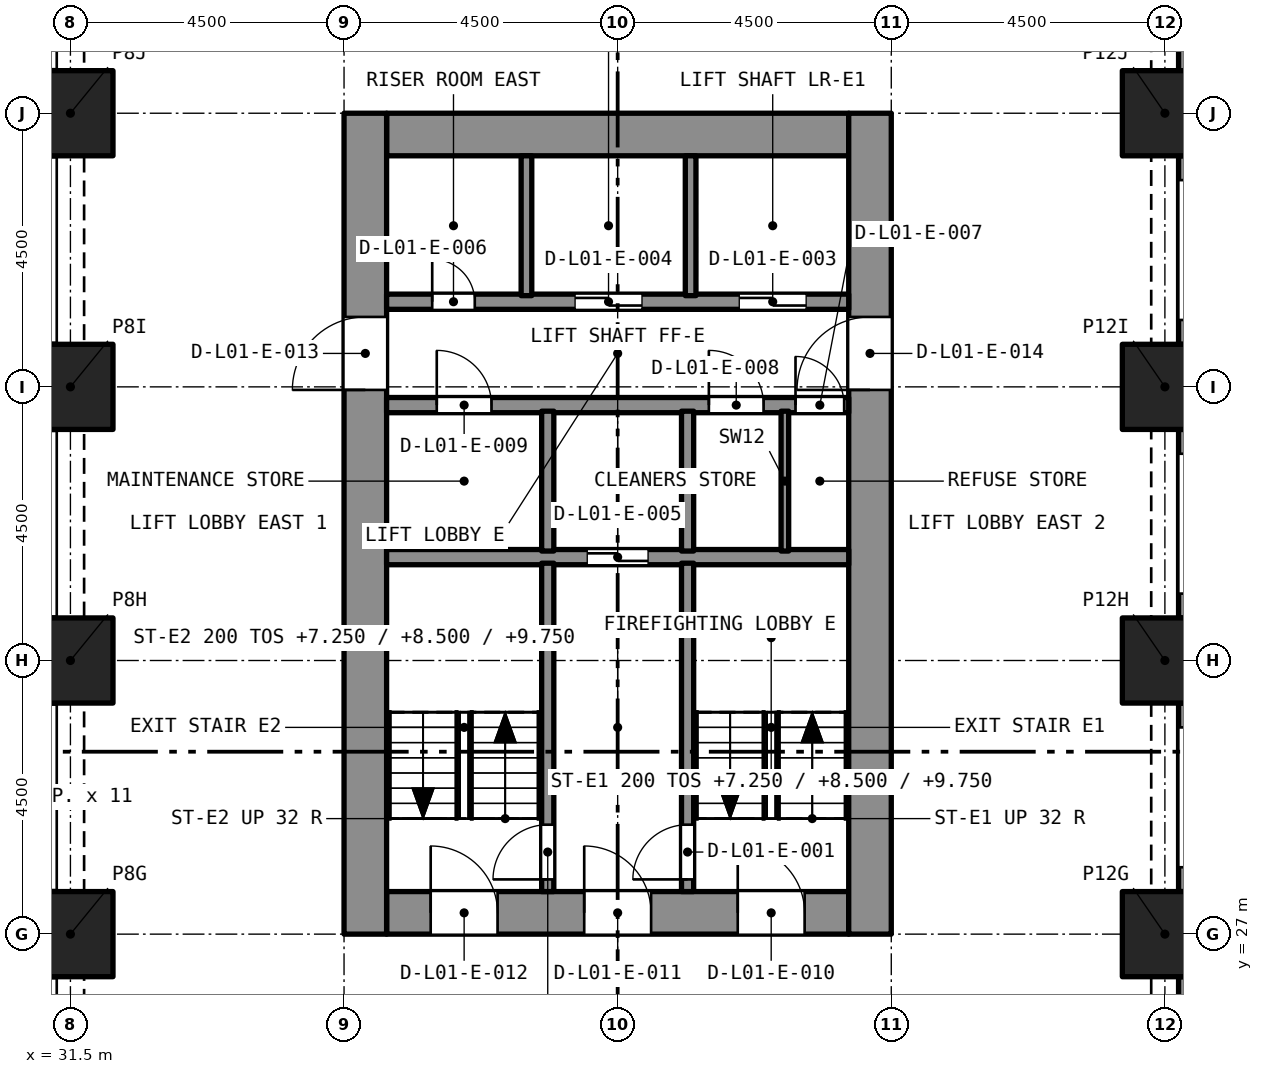
"""IFC4 building model, lengths in metres.
Left out: names, types, materials, properties, quantities, classifications, styles, units other than length and angle.
Written with IfcOpenShell. Run it as: python <this file> out.ifc"""

import sys

from ifc_helpers import new_model, si_unit, direction, frame, frame_2d, origin, origin_2d, place, context, subcontext, project, spatial, rectangle, extrude, element, fill, save


model = new_model("IFC4")
c1 = context("Model", 3, precision=1e-05, world=origin(), true_north=direction((0.0, 1.0)))
c2 = subcontext(c1, "Body", "Model", "MODEL_VIEW")
j1 = project(units=[si_unit("LENGTHUNIT", "METRE"), si_unit("PLANEANGLEUNIT", "RADIAN")], contexts=[c1])
p1 = place(None, origin())
s1 = spatial("IfcSite", under=j1, at=p1, CompositionType="ELEMENT")
p2 = place(p1, origin())
s2 = spatial("IfcBuilding", under=s1, at=p2, CompositionType="ELEMENT")
p3 = place(p2, frame((0.0, 0.0, 6.0)))
s3 = spatial("IfcBuildingStorey", under=s2, at=p3, CompositionType="ELEMENT", Elevation=6.0)
for number, where, z_axis, x_axis in (
    (1, (31.5, 27.0, 0.0), (0.0, 0.0, 1.0), (1.0, 0.0, 0.0)),
    (2, (49.5, 27.0, 0.0), (0.0, 0.0, 1.0), (1.0, 0.0, 0.0)),
    (3, (31.5, 31.5, 0.0), (0.0, 0.0, 1.0), (1.0, 0.0, 0.0)),
    (4, (49.5, 31.5, 0.0), (0.0, 0.0, 1.0), (1.0, 0.0, 0.0)),
    (5, (31.5, 36.0, 0.0), (0.0, 0.0, 1.0), (1.0, 0.0, 0.0)),
    (6, (49.5, 36.0, 0.0), (0.0, 0.0, 1.0), (1.0, 0.0, 0.0)),
    (7, (31.5, 40.5, 0.0), (0.0, 0.0, 1.0), (1.0, 0.0, 0.0)),
    (8, (49.5, 40.5, 0.0), (0.0, 0.0, 1.0), (1.0, 0.0, 0.0)),
):
    element("IfcColumn", number, at=place(p3, frame(where, z_axis=z_axis, x_axis=x_axis)), inside=s3, PredefinedType="COLUMN", context=c2, shape_type="SweptSolid", body=[
        extrude(rectangle(XDim=1.4, YDim=1.4, at=origin_2d()), origin(), (0.0, 0.0, 1.0), 5.0),
    ])
p4 = place(p3, frame((36.7, 27.35, 0.0), z_axis=(0.0, 0.0, 1.0), x_axis=(1.0, 0.0, 0.0)))
e9 = element("IfcWall", 9, at=p4, inside=s3, PredefinedType="SOLIDWALL", context=c2, shape_type="SweptSolid", body=[
    extrude(rectangle(XDim=7.6, YDim=0.7, at=frame_2d((3.8, 0.0))), origin(), (0.0, 0.0, 1.0), 5.0),
])
p5 = place(p4, frame((5.775, 0.0, 0.0)))
e10 = element("IfcOpeningElement", 10, at=p5, cuts=e9, PredefinedType="OPENING", context=c2, shape_type="SweptSolid", body=[
    extrude(rectangle(XDim=1.1, YDim=2.1, at=frame_2d((0.55, 1.05))), frame((0.0, 0.36, 0.0), z_axis=(0.0, -1.0, 0.0), x_axis=(1.0, 0.0, 0.0)), (0.0, 0.0, 1.0), 0.72),
])
p6 = place(p4, frame((3.25, 0.0, 0.0)))
e11 = element("IfcOpeningElement", 11, at=p6, cuts=e9, PredefinedType="OPENING", context=c2, shape_type="SweptSolid", body=[
    extrude(rectangle(XDim=1.1, YDim=2.1, at=frame_2d((0.55, 1.05))), frame((0.0, 0.36, 0.0), z_axis=(0.0, -1.0, 0.0), x_axis=(1.0, 0.0, 0.0)), (0.0, 0.0, 1.0), 0.72),
])
p7 = place(p4, frame((0.725, 0.0, 0.0)))
e12 = element("IfcOpeningElement", 12, at=p7, cuts=e9, PredefinedType="OPENING", context=c2, shape_type="SweptSolid", body=[
    extrude(rectangle(XDim=1.1, YDim=2.1, at=frame_2d((0.55, 1.05))), frame((0.0, 0.36, 0.0), z_axis=(0.0, -1.0, 0.0), x_axis=(1.0, 0.0, 0.0)), (0.0, 0.0, 1.0), 0.72),
])
p8 = place(p3, frame((36.7, 40.15, 0.0), z_axis=(0.0, 0.0, 1.0), x_axis=(1.0, 0.0, 0.0)))
e13 = element("IfcWall", 13, at=p8, inside=s3, PredefinedType="SOLIDWALL", context=c2, shape_type="SweptSolid", body=[
    extrude(rectangle(XDim=7.6, YDim=0.7, at=frame_2d((3.8, 0.0))), origin(), (0.0, 0.0, 1.0), 5.0),
])
p9 = place(p3, frame((36.35, 27.0, 0.0), z_axis=(0.0, 0.0, 1.0), x_axis=(0.0, 1.0, 0.0)))
e14 = element("IfcWall", 14, at=p9, inside=s3, PredefinedType="SOLIDWALL", context=c2, shape_type="SweptSolid", body=[
    extrude(rectangle(XDim=13.5, YDim=0.7, at=frame_2d((6.75, 0.0))), origin(), (0.0, 0.0, 1.0), 5.0),
])
p10 = place(p9, frame((8.95, 0.0, 0.0)))
e15 = element("IfcOpeningElement", 15, at=p10, cuts=e14, PredefinedType="OPENING", context=c2, shape_type="SweptSolid", body=[
    extrude(rectangle(XDim=1.2, YDim=2.1, at=frame_2d((0.6, 1.05))), frame((0.0, 0.36, 0.0), z_axis=(0.0, -1.0, 0.0), x_axis=(1.0, 0.0, 0.0)), (0.0, 0.0, 1.0), 0.72),
])
p11 = place(p3, frame((44.65, 27.0, 0.0), z_axis=(0.0, 0.0, 1.0), x_axis=(0.0, 1.0, 0.0)))
e16 = element("IfcWall", 16, at=p11, inside=s3, PredefinedType="SOLIDWALL", context=c2, shape_type="SweptSolid", body=[
    extrude(rectangle(XDim=13.5, YDim=0.7, at=frame_2d((6.75, 0.0))), origin(), (0.0, 0.0, 1.0), 5.0),
])
p12 = place(p11, frame((8.95, 0.0, 0.0)))
e17 = element("IfcOpeningElement", 17, at=p12, cuts=e16, PredefinedType="OPENING", context=c2, shape_type="SweptSolid", body=[
    extrude(rectangle(XDim=1.2, YDim=2.1, at=frame_2d((0.6, 1.05))), frame((0.0, 0.36, 0.0), z_axis=(0.0, -1.0, 0.0), x_axis=(1.0, 0.0, 0.0)), (0.0, 0.0, 1.0), 0.72),
])
p13 = place(p3, frame((49.875, 26.3, 0.0), z_axis=(0.0, 0.0, 1.0), x_axis=(0.0, -1.0, 0.0)))
e18 = element("IfcWall", 18, at=p13, inside=s3, PredefinedType="SOLIDWALL", context=c2, shape_type="SweptSolid", body=[
    extrude(rectangle(XDim=3.1, YDim=0.3, at=frame_2d((1.55, 0.0))), origin(), (0.0, 0.0, 1.0), 5.0),
])
p14 = place(p13, frame((0.4, 0.0, 0.45)))
e19 = element("IfcOpeningElement", 19, at=p14, cuts=e18, PredefinedType="OPENING", context=c2, shape_type="SweptSolid", body=[
    extrude(rectangle(XDim=2.3, YDim=3.3, at=frame_2d((1.15, 1.65))), frame((0.0, 0.16, 0.0), z_axis=(0.0, -1.0, 0.0), x_axis=(1.0, 0.0, 0.0)), (0.0, 0.0, 1.0), 0.32),
])
p15 = place(p3, frame((49.875, 30.8, 0.0), z_axis=(0.0, 0.0, 1.0), x_axis=(0.0, -1.0, 0.0)))
e20 = element("IfcWall", 20, at=p15, inside=s3, PredefinedType="SOLIDWALL", context=c2, shape_type="SweptSolid", body=[
    extrude(rectangle(XDim=3.1, YDim=0.3, at=frame_2d((1.55, 0.0))), origin(), (0.0, 0.0, 1.0), 5.0),
])
p16 = place(p15, frame((0.4, 0.0, 0.45)))
e21 = element("IfcOpeningElement", 21, at=p16, cuts=e20, PredefinedType="OPENING", context=c2, shape_type="SweptSolid", body=[
    extrude(rectangle(XDim=2.3, YDim=3.3, at=frame_2d((1.15, 1.65))), frame((0.0, 0.16, 0.0), z_axis=(0.0, -1.0, 0.0), x_axis=(1.0, 0.0, 0.0)), (0.0, 0.0, 1.0), 0.32),
])
p17 = place(p3, frame((49.875, 35.3, 0.0), z_axis=(0.0, 0.0, 1.0), x_axis=(0.0, -1.0, 0.0)))
e22 = element("IfcWall", 22, at=p17, inside=s3, PredefinedType="SOLIDWALL", context=c2, shape_type="SweptSolid", body=[
    extrude(rectangle(XDim=3.1, YDim=0.3, at=frame_2d((1.55, 0.0))), origin(), (0.0, 0.0, 1.0), 5.0),
])
p18 = place(p17, frame((0.4, 0.0, 0.45)))
e23 = element("IfcOpeningElement", 23, at=p18, cuts=e22, PredefinedType="OPENING", context=c2, shape_type="SweptSolid", body=[
    extrude(rectangle(XDim=2.3, YDim=3.3, at=frame_2d((1.15, 1.65))), frame((0.0, 0.16, 0.0), z_axis=(0.0, -1.0, 0.0), x_axis=(1.0, 0.0, 0.0)), (0.0, 0.0, 1.0), 0.32),
])
p19 = place(p3, frame((49.875, 39.8, 0.0), z_axis=(0.0, 0.0, 1.0), x_axis=(0.0, -1.0, 0.0)))
e24 = element("IfcWall", 24, at=p19, inside=s3, PredefinedType="SOLIDWALL", context=c2, shape_type="SweptSolid", body=[
    extrude(rectangle(XDim=3.1, YDim=0.3, at=frame_2d((1.55, 0.0))), origin(), (0.0, 0.0, 1.0), 5.0),
])
p20 = place(p19, frame((0.4, 0.0, 0.45)))
e25 = element("IfcOpeningElement", 25, at=p20, cuts=e24, PredefinedType="OPENING", context=c2, shape_type="SweptSolid", body=[
    extrude(rectangle(XDim=2.3, YDim=3.3, at=frame_2d((1.15, 1.65))), frame((0.0, 0.16, 0.0), z_axis=(0.0, -1.0, 0.0), x_axis=(1.0, 0.0, 0.0)), (0.0, 0.0, 1.0), 0.32),
])
p21 = place(p3, frame((49.875, 44.3, 0.0), z_axis=(0.0, 0.0, 1.0), x_axis=(0.0, -1.0, 0.0)))
e26 = element("IfcWall", 26, at=p21, inside=s3, PredefinedType="SOLIDWALL", context=c2, shape_type="SweptSolid", body=[
    extrude(rectangle(XDim=3.1, YDim=0.3, at=frame_2d((1.55, 0.0))), origin(), (0.0, 0.0, 1.0), 5.0),
])
p22 = place(p21, frame((0.4, 0.0, 0.45)))
e27 = element("IfcOpeningElement", 27, at=p22, cuts=e26, PredefinedType="OPENING", context=c2, shape_type="SweptSolid", body=[
    extrude(rectangle(XDim=2.3, YDim=3.3, at=frame_2d((1.15, 1.65))), frame((0.0, 0.16, 0.0), z_axis=(0.0, -1.0, 0.0), x_axis=(1.0, 0.0, 0.0)), (0.0, 0.0, 1.0), 0.32),
])
p23 = place(p3, frame((36.7, 33.2, 0.0), z_axis=(0.0, 0.0, 1.0), x_axis=(1.0, 0.0, 0.0)))
e28 = element("IfcWall", 28, at=p23, inside=s3, PredefinedType="SOLIDWALL", context=c2, shape_type="SweptSolid", body=[
    extrude(rectangle(XDim=7.6, YDim=0.25, at=frame_2d((3.8, 0.0))), origin(), (0.0, 0.0, 1.0), 4.65),
])
p24 = place(p23, frame((3.3, 0.0, 0.0)))
e29 = element("IfcOpeningElement", 29, at=p24, cuts=e28, PredefinedType="OPENING", context=c2, shape_type="SweptSolid", body=[
    extrude(rectangle(XDim=1.0, YDim=2.1, at=frame_2d((0.5, 1.05))), frame((0.0, 0.135, 0.0), z_axis=(0.0, -1.0, 0.0), x_axis=(1.0, 0.0, 0.0)), (0.0, 0.0, 1.0), 0.27),
])
p25 = place(p3, frame((36.7, 35.7, 0.0), z_axis=(0.0, 0.0, 1.0), x_axis=(1.0, 0.0, 0.0)))
e30 = element("IfcWall", 30, at=p25, inside=s3, PredefinedType="SOLIDWALL", context=c2, shape_type="SweptSolid", body=[
    extrude(rectangle(XDim=7.6, YDim=0.25, at=frame_2d((3.8, 0.0))), origin(), (0.0, 0.0, 1.0), 4.65),
])
p26 = place(p25, frame((6.725, 0.0, 0.0)))
e31 = element("IfcOpeningElement", 31, at=p26, cuts=e30, PredefinedType="OPENING", context=c2, shape_type="SweptSolid", body=[
    extrude(rectangle(XDim=0.8, YDim=2.1, at=frame_2d((0.4, 1.05))), frame((0.0, 0.135, 0.0), z_axis=(0.0, -1.0, 0.0), x_axis=(1.0, 0.0, 0.0)), (0.0, 0.0, 1.0), 0.27),
])
p27 = place(p25, frame((5.3, 0.0, 0.0)))
e32 = element("IfcOpeningElement", 32, at=p27, cuts=e30, PredefinedType="OPENING", context=c2, shape_type="SweptSolid", body=[
    extrude(rectangle(XDim=0.9, YDim=2.1, at=frame_2d((0.45, 1.05))), frame((0.0, 0.135, 0.0), z_axis=(0.0, -1.0, 0.0), x_axis=(1.0, 0.0, 0.0)), (0.0, 0.0, 1.0), 0.27),
])
p28 = place(p25, frame((0.825, 0.0, 0.0)))
e33 = element("IfcOpeningElement", 33, at=p28, cuts=e30, PredefinedType="OPENING", context=c2, shape_type="SweptSolid", body=[
    extrude(rectangle(XDim=0.9, YDim=2.1, at=frame_2d((0.45, 1.05))), frame((0.0, 0.135, 0.0), z_axis=(0.0, -1.0, 0.0), x_axis=(1.0, 0.0, 0.0)), (0.0, 0.0, 1.0), 0.27),
])
p29 = place(p3, frame((36.7, 37.4, 0.0), z_axis=(0.0, 0.0, 1.0), x_axis=(1.0, 0.0, 0.0)))
e34 = element("IfcWall", 34, at=p29, inside=s3, PredefinedType="SOLIDWALL", context=c2, shape_type="SweptSolid", body=[
    extrude(rectangle(XDim=7.6, YDim=0.25, at=frame_2d((3.8, 0.0))), origin(), (0.0, 0.0, 1.0), 4.65),
])
p30 = place(p29, frame((5.8, 0.0, 0.0)))
e35 = element("IfcOpeningElement", 35, at=p30, cuts=e34, PredefinedType="OPENING", context=c2, shape_type="SweptSolid", body=[
    extrude(rectangle(XDim=1.1, YDim=2.4, at=frame_2d((0.55, 1.2))), frame((0.0, 0.135, 0.0), z_axis=(0.0, -1.0, 0.0), x_axis=(1.0, 0.0, 0.0)), (0.0, 0.0, 1.0), 0.27),
])
p31 = place(p29, frame((3.1, 0.0, 0.0)))
e36 = element("IfcOpeningElement", 36, at=p31, cuts=e34, PredefinedType="OPENING", context=c2, shape_type="SweptSolid", body=[
    extrude(rectangle(XDim=1.1, YDim=2.4, at=frame_2d((0.55, 1.2))), frame((0.0, 0.135, 0.0), z_axis=(0.0, -1.0, 0.0), x_axis=(1.0, 0.0, 0.0)), (0.0, 0.0, 1.0), 0.27),
])
p32 = place(p29, frame((0.75, 0.0, 0.0)))
e37 = element("IfcOpeningElement", 37, at=p32, cuts=e34, PredefinedType="OPENING", context=c2, shape_type="SweptSolid", body=[
    extrude(rectangle(XDim=0.7, YDim=2.1, at=frame_2d((0.35, 1.05))), frame((0.0, 0.135, 0.0), z_axis=(0.0, -1.0, 0.0), x_axis=(1.0, 0.0, 0.0)), (0.0, 0.0, 1.0), 0.27),
])
p33 = place(p3, frame((41.65, 27.7, 0.0), z_axis=(0.0, 0.0, 1.0), x_axis=(0.0, 1.0, 0.0)))
e38 = element("IfcWall", 38, at=p33, inside=s3, PredefinedType="SOLIDWALL", context=c2, shape_type="SweptSolid", body=[
    extrude(rectangle(XDim=5.4, YDim=0.2, at=frame_2d((2.7, 0.0))), origin(), (0.0, 0.0, 1.0), 4.65),
])
p34 = place(p33, frame((0.2, 0.0, 0.0)))
e39 = element("IfcOpeningElement", 39, at=p34, cuts=e38, PredefinedType="OPENING", context=c2, shape_type="SweptSolid", body=[
    extrude(rectangle(XDim=0.9, YDim=2.1, at=frame_2d((0.45, 1.05))), frame((0.0, 0.11, 0.0), z_axis=(0.0, -1.0, 0.0), x_axis=(1.0, 0.0, 0.0)), (0.0, 0.0, 1.0), 0.22),
])
p35 = place(p3, frame((39.35, 27.7, 0.0), z_axis=(0.0, 0.0, 1.0), x_axis=(0.0, 1.0, 0.0)))
e40 = element("IfcWall", 40, at=p35, inside=s3, PredefinedType="SOLIDWALL", context=c2, shape_type="SweptSolid", body=[
    extrude(rectangle(XDim=5.4, YDim=0.2, at=frame_2d((2.7, 0.0))), origin(), (0.0, 0.0, 1.0), 4.65),
])
p36 = place(p35, frame((0.2, 0.0, 0.0)))
e41 = element("IfcOpeningElement", 41, at=p36, cuts=e40, PredefinedType="OPENING", context=c2, shape_type="SweptSolid", body=[
    extrude(rectangle(XDim=0.9, YDim=2.1, at=frame_2d((0.45, 1.05))), frame((0.0, 0.11, 0.0), z_axis=(0.0, -1.0, 0.0), x_axis=(1.0, 0.0, 0.0)), (0.0, 0.0, 1.0), 0.22),
])
for number, where, z_axis, x_axis in (
    (42, (41.65, 33.3, 0.0), (0.0, 0.0, 1.0), (0.0, 1.0, 0.0)),
    (43, (39.35, 33.3, 0.0), (0.0, 0.0, 1.0), (0.0, 1.0, 0.0)),
):
    element("IfcWall", number, at=place(p3, frame(where, z_axis=z_axis, x_axis=x_axis)), inside=s3, PredefinedType="SOLIDWALL", context=c2, shape_type="SweptSolid", body=[
        extrude(rectangle(XDim=2.3, YDim=0.2, at=frame_2d((1.15, 0.0))), origin(), (0.0, 0.0, 1.0), 4.65),
    ])
for number, where, z_axis, x_axis in (
    (44, (41.7, 37.5, 0.0), (0.0, 0.0, 1.0), (0.0, 1.0, 0.0)),
    (45, (39.0, 37.5, 0.0), (0.0, 0.0, 1.0), (0.0, 1.0, 0.0)),
):
    element("IfcWall", number, at=place(p3, frame(where, z_axis=z_axis, x_axis=x_axis)), inside=s3, PredefinedType="SOLIDWALL", context=c2, shape_type="SweptSolid", body=[
        extrude(rectangle(XDim=2.3, YDim=0.175, at=frame_2d((1.15, 0.0))), origin(), (0.0, 0.0, 1.0), 4.65),
    ])
p37 = place(p3, frame((43.25, 33.3, 0.0), z_axis=(0.0, 0.0, 1.0), x_axis=(0.0, 1.0, 0.0)))
e46 = element("IfcWall", 46, at=p37, inside=s3, PredefinedType="PARTITIONING", context=c2, shape_type="SweptSolid", body=[
    extrude(rectangle(XDim=2.3, YDim=0.125, at=frame_2d((1.15, 0.0))), origin(), (0.0, 0.0, 1.0), 4.65),
])
p38 = place(p34, origin())
e47 = element("IfcDoor", 47, at=p38, inside=s3, OperationType="SINGLE_SWING_LEFT", PredefinedType="DOOR", context=c2, shape_type="SweptSolid", body=[
    extrude(rectangle(XDim=0.9, YDim=2.1, at=frame_2d((0.45, 1.05))), frame((0.0, 0.025, 0.0), z_axis=(0.0, -1.0, 0.0), x_axis=(1.0, 0.0, 0.0)), (0.0, 0.0, 1.0), 0.05),
])
fill(e39, e47)
p39 = place(p36, origin())
e48 = element("IfcDoor", 48, at=p39, inside=s3, OperationType="SINGLE_SWING_LEFT", PredefinedType="DOOR", context=c2, shape_type="SweptSolid", body=[
    extrude(rectangle(XDim=0.9, YDim=2.1, at=frame_2d((0.45, 1.05))), frame((0.0, 0.025, 0.0), z_axis=(0.0, -1.0, 0.0), x_axis=(1.0, 0.0, 0.0)), (0.0, 0.0, 1.0), 0.05),
])
fill(e41, e48)
p40 = place(p30, origin())
e49 = element("IfcDoor", 49, at=p40, inside=s3, OperationType="SLIDING_TO_LEFT", PredefinedType="DOOR", context=c2, shape_type="SweptSolid", body=[
    extrude(rectangle(XDim=1.1, YDim=2.4, at=frame_2d((0.55, 1.2))), frame((0.0, 0.025, 0.0), z_axis=(0.0, -1.0, 0.0), x_axis=(1.0, 0.0, 0.0)), (0.0, 0.0, 1.0), 0.05),
])
fill(e35, e49)
p41 = place(p31, origin())
e50 = element("IfcDoor", 50, at=p41, inside=s3, OperationType="SLIDING_TO_LEFT", PredefinedType="DOOR", context=c2, shape_type="SweptSolid", body=[
    extrude(rectangle(XDim=1.1, YDim=2.4, at=frame_2d((0.55, 1.2))), frame((0.0, 0.025, 0.0), z_axis=(0.0, -1.0, 0.0), x_axis=(1.0, 0.0, 0.0)), (0.0, 0.0, 1.0), 0.05),
])
fill(e36, e50)
p42 = place(p24, origin())
e51 = element("IfcDoor", 51, at=p42, inside=s3, OperationType="SLIDING_TO_LEFT", PredefinedType="DOOR", context=c2, shape_type="SweptSolid", body=[
    extrude(rectangle(XDim=1.0, YDim=2.1, at=frame_2d((0.5, 1.05))), frame((0.0, 0.025, 0.0), z_axis=(0.0, -1.0, 0.0), x_axis=(1.0, 0.0, 0.0)), (0.0, 0.0, 1.0), 0.05),
])
fill(e29, e51)
p43 = place(p32, origin())
e52 = element("IfcDoor", 52, at=p43, inside=s3, OperationType="SINGLE_SWING_LEFT", PredefinedType="DOOR", context=c2, shape_type="SweptSolid", body=[
    extrude(rectangle(XDim=0.7, YDim=2.1, at=frame_2d((0.35, 1.05))), frame((0.0, 0.025, 0.0), z_axis=(0.0, -1.0, 0.0), x_axis=(1.0, 0.0, 0.0)), (0.0, 0.0, 1.0), 0.05),
])
fill(e37, e52)
p44 = place(p26, origin())
e53 = element("IfcDoor", 53, at=p44, inside=s3, OperationType="SINGLE_SWING_LEFT", PredefinedType="DOOR", context=c2, shape_type="SweptSolid", body=[
    extrude(rectangle(XDim=0.8, YDim=2.1, at=frame_2d((0.4, 1.05))), frame((0.0, 0.025, 0.0), z_axis=(0.0, -1.0, 0.0), x_axis=(1.0, 0.0, 0.0)), (0.0, 0.0, 1.0), 0.05),
])
fill(e31, e53)
p45 = place(p27, origin())
e54 = element("IfcDoor", 54, at=p45, inside=s3, OperationType="SINGLE_SWING_LEFT", PredefinedType="DOOR", context=c2, shape_type="SweptSolid", body=[
    extrude(rectangle(XDim=0.9, YDim=2.1, at=frame_2d((0.45, 1.05))), frame((0.0, 0.025, 0.0), z_axis=(0.0, -1.0, 0.0), x_axis=(1.0, 0.0, 0.0)), (0.0, 0.0, 1.0), 0.05),
])
fill(e32, e54)
p46 = place(p28, origin())
e55 = element("IfcDoor", 55, at=p46, inside=s3, OperationType="SINGLE_SWING_LEFT", PredefinedType="DOOR", context=c2, shape_type="SweptSolid", body=[
    extrude(rectangle(XDim=0.9, YDim=2.1, at=frame_2d((0.45, 1.05))), frame((0.0, 0.025, 0.0), z_axis=(0.0, -1.0, 0.0), x_axis=(1.0, 0.0, 0.0)), (0.0, 0.0, 1.0), 0.05),
])
fill(e33, e55)
p47 = place(p5, origin())
e56 = element("IfcDoor", 56, at=p47, inside=s3, OperationType="SINGLE_SWING_LEFT", PredefinedType="DOOR", context=c2, shape_type="SweptSolid", body=[
    extrude(rectangle(XDim=1.1, YDim=2.1, at=frame_2d((0.55, 1.05))), frame((0.0, 0.025, 0.0), z_axis=(0.0, -1.0, 0.0), x_axis=(1.0, 0.0, 0.0)), (0.0, 0.0, 1.0), 0.05),
])
fill(e10, e56)
p48 = place(p6, origin())
e57 = element("IfcDoor", 57, at=p48, inside=s3, OperationType="SINGLE_SWING_LEFT", PredefinedType="DOOR", context=c2, shape_type="SweptSolid", body=[
    extrude(rectangle(XDim=1.1, YDim=2.1, at=frame_2d((0.55, 1.05))), frame((0.0, 0.025, 0.0), z_axis=(0.0, -1.0, 0.0), x_axis=(1.0, 0.0, 0.0)), (0.0, 0.0, 1.0), 0.05),
])
fill(e11, e57)
p49 = place(p7, origin())
e58 = element("IfcDoor", 58, at=p49, inside=s3, OperationType="SINGLE_SWING_LEFT", PredefinedType="DOOR", context=c2, shape_type="SweptSolid", body=[
    extrude(rectangle(XDim=1.1, YDim=2.1, at=frame_2d((0.55, 1.05))), frame((0.0, 0.025, 0.0), z_axis=(0.0, -1.0, 0.0), x_axis=(1.0, 0.0, 0.0)), (0.0, 0.0, 1.0), 0.05),
])
fill(e12, e58)
p50 = place(p10, origin())
e59 = element("IfcDoor", 59, at=p50, inside=s3, OperationType="SINGLE_SWING_LEFT", PredefinedType="DOOR", context=c2, shape_type="SweptSolid", body=[
    extrude(rectangle(XDim=1.2, YDim=2.1, at=frame_2d((0.6, 1.05))), frame((0.0, 0.025, 0.0), z_axis=(0.0, -1.0, 0.0), x_axis=(1.0, 0.0, 0.0)), (0.0, 0.0, 1.0), 0.05),
])
fill(e15, e59)
p51 = place(p12, origin())
e60 = element("IfcDoor", 60, at=p51, inside=s3, OperationType="SINGLE_SWING_LEFT", PredefinedType="DOOR", context=c2, shape_type="SweptSolid", body=[
    extrude(rectangle(XDim=1.2, YDim=2.1, at=frame_2d((0.6, 1.05))), frame((0.0, 0.025, 0.0), z_axis=(0.0, -1.0, 0.0), x_axis=(1.0, 0.0, 0.0)), (0.0, 0.0, 1.0), 0.05),
])
fill(e17, e60)
save(model, sys.argv[1])
